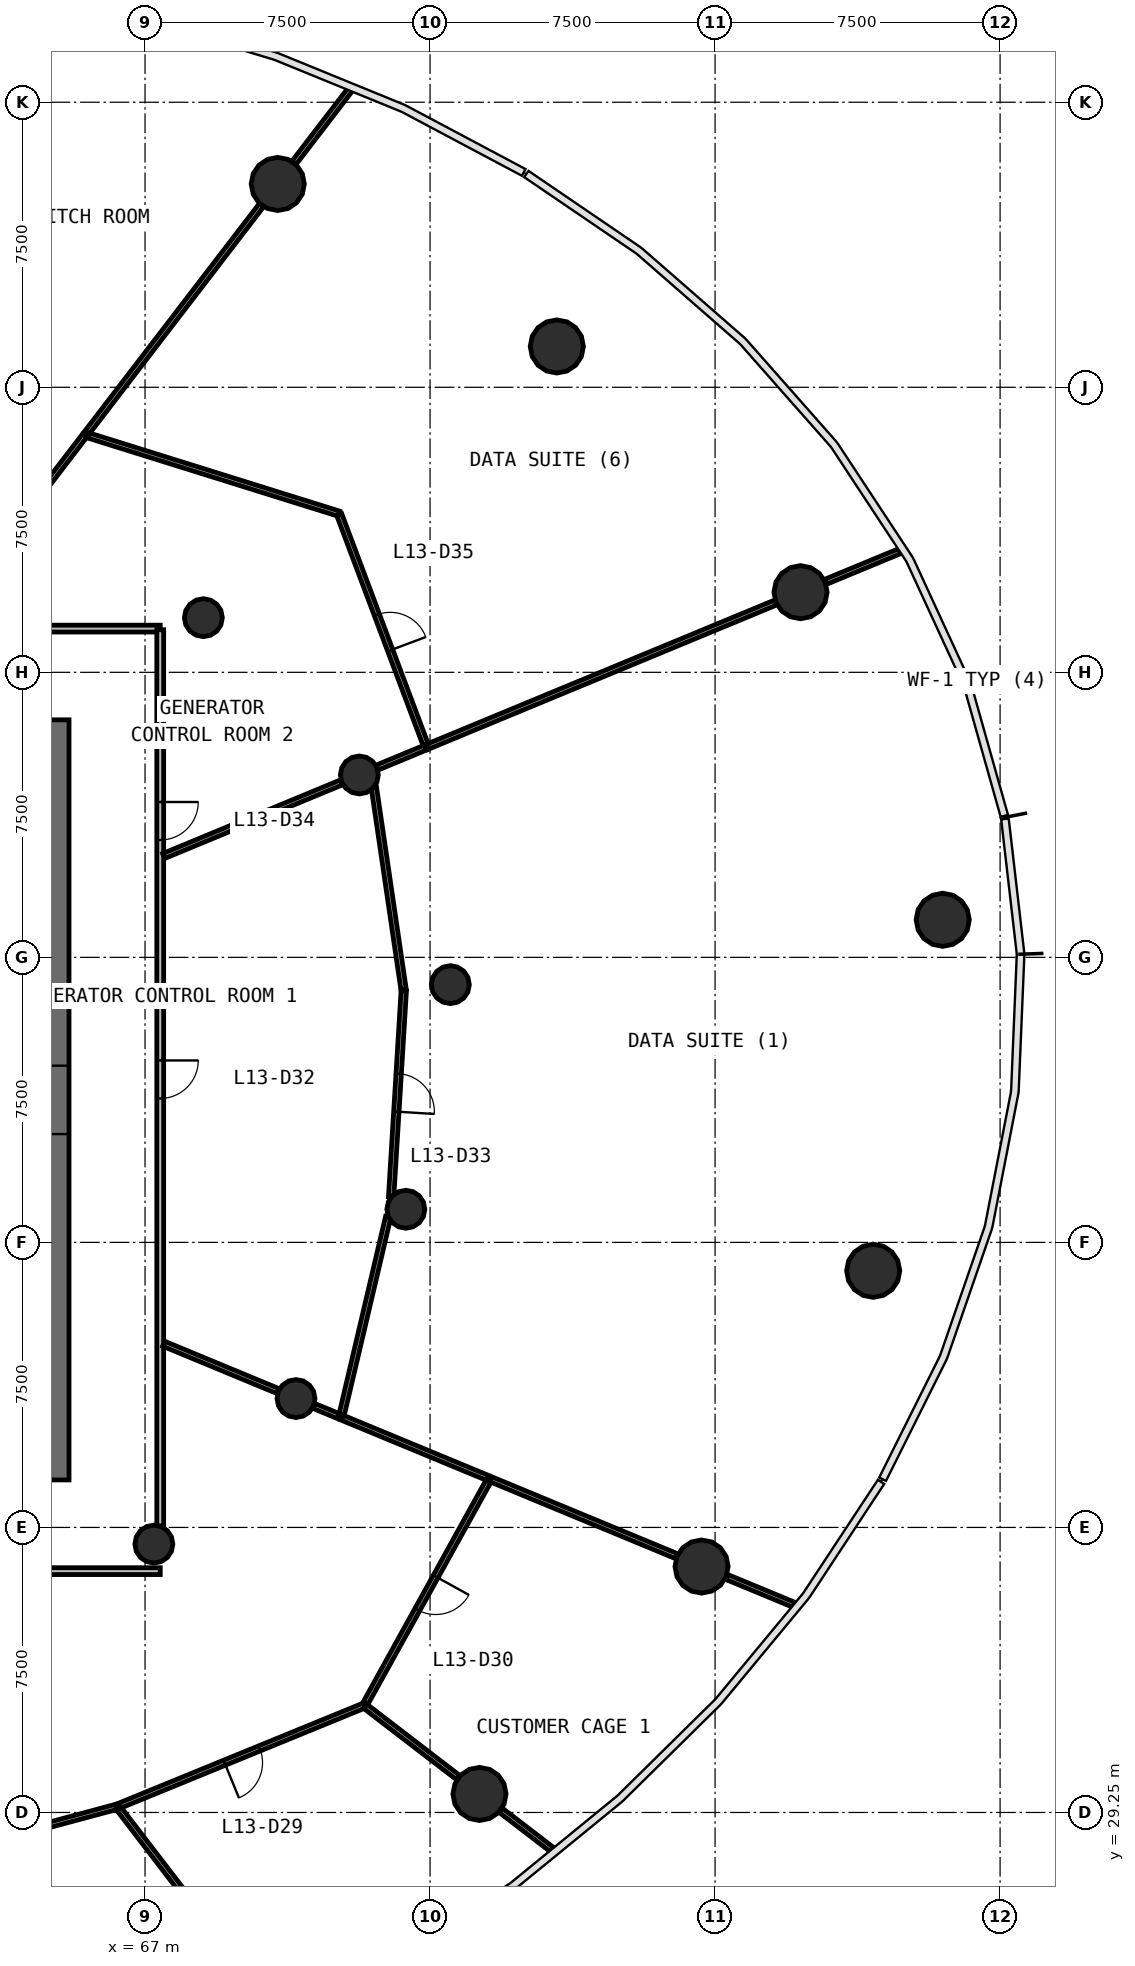
"""IFC4 building model, lengths in metres.
Left out: names, types, materials, properties, quantities, classifications, styles, units other than length and angle.
Written with IfcOpenShell. Run it as: python <this file> out.ifc"""

import sys

from ifc_helpers import new_model, si_unit, direction, frame, frame_2d, origin, origin_2d, place, context, subcontext, project, spatial, rectangle, circle, extrude, source, transform, mapped, element, fill, save


model = new_model("IFC4")
c1 = context("Model", 3, precision=1e-05, world=origin(), true_north=direction((0.0, 1.0)))
c2 = subcontext(c1, "Body", "Model", "MODEL_VIEW")
j1 = project(units=[si_unit("LENGTHUNIT", "METRE"), si_unit("PLANEANGLEUNIT", "RADIAN")], contexts=[c1])
p1 = place(None, origin())
s1 = spatial("IfcSite", under=j1, at=p1, CompositionType="ELEMENT")
p2 = place(p1, origin())
s2 = spatial("IfcBuilding", under=s1, at=p2, CompositionType="ELEMENT")
p3 = place(p2, frame((0.0, 0.0, 57.8)))
s3 = spatial("IfcBuildingStorey", under=s2, at=p3, CompositionType="ELEMENT", Elevation=57.8)
p4 = place(p3, frame((64.5, 38.0, 0.0), z_axis=(0.0, 0.0, 1.0), x_axis=(0.0, 1.0, 0.0)))
e1 = element("IfcWall", 1, at=p4, inside=s3, PredefinedType="SHEAR", context=c2, shape_type="SweptSolid", body=[
    extrude(rectangle(XDim=20.0, YDim=1.0, at=frame_2d((10.0, 0.0))), origin(), (0.0, 0.0, 1.0), 4.4),
])
p5 = place(p4, frame((9.1, 0.0, 0.0)))
e2 = element("IfcOpeningElement", 2, at=p5, cuts=e1, PredefinedType="OPENING", context=c2, shape_type="SweptSolid", body=[
    extrude(rectangle(XDim=1.8, YDim=2.1, at=frame_2d((0.9, 1.05))), frame((0.0, 0.51, 0.0), z_axis=(0.0, -1.0, 0.0), x_axis=(1.0, 0.0, 0.0)), (0.0, 0.0, 1.0), 1.02),
])
m1 = source(origin(), c2, "Body", "SweptSolid", [
    extrude(circle(Radius=0.7, at=origin_2d()), origin(), (0.0, 0.0, 1.0), 4.4),
])
for number, where, z_axis, x_axis in (
    (3, (87.99, 52.738, 0.0), (0.0, 0.0, 1.0), (1.0, 0.0, 0.0)),
    (4, (84.249, 61.358, 0.0), (0.0, 0.0, 1.0), (1.0, 0.0, 0.0)),
    (5, (77.836, 67.824, 0.0), (0.0, 0.0, 1.0), (1.0, 0.0, 0.0)),
    (6, (70.492, 72.1, 0.0), (0.0, 0.0, 1.0), (1.0, 0.0, 0.0)),
    (7, (75.801, 29.737, 0.0), (0.0, 0.0, 1.0), (1.0, 0.0, 0.0)),
    (8, (81.645, 35.721, 0.0), (0.0, 0.0, 1.0), (1.0, 0.0, 0.0)),
    (9, (86.161, 43.503, 0.0), (0.0, 0.0, 1.0), (1.0, 0.0, 0.0)),
):
    element("IfcColumn", number, at=place(p3, frame(where, z_axis=z_axis, x_axis=x_axis)), inside=s3, PredefinedType="COLUMN", context=c2, shape_type="MappedRepresentation", body=[
        mapped(m1, transform((0.0, 0.0, 0.0), scale=1.0)),
    ])
m2 = source(origin(), c2, "Body", "SweptSolid", [
    extrude(circle(Radius=0.5, at=origin_2d()), origin(), (0.0, 0.0, 1.0), 4.4),
])
for number, where, z_axis, x_axis in (
    (10, (75.034, 51.032, 0.0), (0.0, 0.0, 1.0), (1.0, 0.0, 0.0)),
    (11, (72.639, 56.549, 0.0), (0.0, 0.0, 1.0), (1.0, 0.0, 0.0)),
    (12, (68.535, 60.688, 0.0), (0.0, 0.0, 1.0), (1.0, 0.0, 0.0)),
    (13, (67.232, 36.312, 0.0), (0.0, 0.0, 1.0), (1.0, 0.0, 0.0)),
    (14, (70.972, 40.141, 0.0), (0.0, 0.0, 1.0), (1.0, 0.0, 0.0)),
    (15, (73.863, 45.122, 0.0), (0.0, 0.0, 1.0), (1.0, 0.0, 0.0)),
):
    element("IfcColumn", number, at=place(p3, frame(where, z_axis=z_axis, x_axis=x_axis)), inside=s3, PredefinedType="COLUMN", context=c2, shape_type="MappedRepresentation", body=[
        mapped(m2, transform((0.0, 0.0, 0.0), scale=1.0)),
    ])
p6 = place(p3, frame((67.4, 35.6, 0.0), z_axis=(0.0, 0.0, 1.0), x_axis=(-1.0, 0.0, 0.0)))
e16 = element("IfcWall", 16, at=p6, inside=s3, PredefinedType="PARTITIONING", context=c2, shape_type="SweptSolid", body=[
    extrude(rectangle(XDim=30.8, YDim=0.18, at=frame_2d((15.4, 0.0))), origin(), (0.0, 0.0, 1.0), 3.05),
])
p7 = place(p6, frame((17.25, 0.0, 0.0)))
e17 = element("IfcOpeningElement", 17, at=p7, cuts=e16, PredefinedType="OPENING", context=c2, shape_type="SweptSolid", body=[
    extrude(rectangle(XDim=0.9, YDim=2.1, at=frame_2d((0.45, 1.05))), frame((0.0, 0.1, 0.0), z_axis=(0.0, -1.0, 0.0), x_axis=(1.0, 0.0, 0.0)), (0.0, 0.0, 1.0), 0.2),
])
p8 = place(p6, frame((14.85, 0.0, 0.0)))
e18 = element("IfcOpeningElement", 18, at=p8, cuts=e16, PredefinedType="OPENING", context=c2, shape_type="SweptSolid", body=[
    extrude(rectangle(XDim=0.9, YDim=2.1, at=frame_2d((0.45, 1.05))), frame((0.0, 0.1, 0.0), z_axis=(0.0, -1.0, 0.0), x_axis=(1.0, 0.0, 0.0)), (0.0, 0.0, 1.0), 0.2),
])
p9 = place(p6, frame((12.55, 0.0, 0.0)))
e19 = element("IfcOpeningElement", 19, at=p9, cuts=e16, PredefinedType="OPENING", context=c2, shape_type="SweptSolid", body=[
    extrude(rectangle(XDim=1.0, YDim=2.1, at=frame_2d((0.5, 1.05))), frame((0.0, 0.1, 0.0), z_axis=(0.0, -1.0, 0.0), x_axis=(1.0, 0.0, 0.0)), (0.0, 0.0, 1.0), 0.2),
])
p10 = place(p6, frame((20.95, 0.0, 0.0)))
e20 = element("IfcOpeningElement", 20, at=p10, cuts=e16, PredefinedType="OPENING", context=c2, shape_type="SweptSolid", body=[
    extrude(rectangle(XDim=1.0, YDim=2.1, at=frame_2d((0.5, 1.05))), frame((0.0, 0.1, 0.0), z_axis=(0.0, -1.0, 0.0), x_axis=(1.0, 0.0, 0.0)), (0.0, 0.0, 1.0), 0.2),
])
p11 = place(p3, frame((36.6, 60.4, 0.0), z_axis=(0.0, 0.0, 1.0), x_axis=(1.0, 0.0, 0.0)))
e21 = element("IfcWall", 21, at=p11, inside=s3, PredefinedType="PARTITIONING", context=c2, shape_type="SweptSolid", body=[
    extrude(rectangle(XDim=30.8, YDim=0.18, at=frame_2d((15.4, 0.0))), origin(), (0.0, 0.0, 1.0), 3.05),
])
p12 = place(p11, frame((20.95, 0.0, 0.0)))
e22 = element("IfcOpeningElement", 22, at=p12, cuts=e21, PredefinedType="OPENING", context=c2, shape_type="SweptSolid", body=[
    extrude(rectangle(XDim=1.0, YDim=2.1, at=frame_2d((0.5, 1.05))), frame((0.0, 0.1, 0.0), z_axis=(0.0, -1.0, 0.0), x_axis=(1.0, 0.0, 0.0)), (0.0, 0.0, 1.0), 0.2),
])
p13 = place(p11, frame((14.95, 0.0, 0.0)))
e23 = element("IfcOpeningElement", 23, at=p13, cuts=e21, PredefinedType="OPENING", context=c2, shape_type="SweptSolid", body=[
    extrude(rectangle(XDim=1.0, YDim=2.1, at=frame_2d((0.5, 1.05))), frame((0.0, 0.1, 0.0), z_axis=(0.0, -1.0, 0.0), x_axis=(1.0, 0.0, 0.0)), (0.0, 0.0, 1.0), 0.2),
])
p14 = place(p11, frame((4.35, 0.0, 0.0)))
e24 = element("IfcOpeningElement", 24, at=p14, cuts=e21, PredefinedType="OPENING", context=c2, shape_type="SweptSolid", body=[
    extrude(rectangle(XDim=1.0, YDim=2.1, at=frame_2d((0.5, 1.05))), frame((0.0, 0.1, 0.0), z_axis=(0.0, -1.0, 0.0), x_axis=(1.0, 0.0, 0.0)), (0.0, 0.0, 1.0), 0.2),
])
p15 = place(p3, frame((67.4, 60.37, 0.0), z_axis=(0.0, 0.0, 1.0), x_axis=(0.0, -1.0, 0.0)))
e25 = element("IfcWall", 25, at=p15, inside=s3, PredefinedType="PARTITIONING", context=c2, shape_type="SweptSolid", body=[
    extrude(rectangle(XDim=23.583, YDim=0.18, at=frame_2d((11.791, 0.0))), origin(), (0.0, 0.0, 1.0), 3.05),
])
p16 = place(p15, frame((11.333, 0.0, 0.0)))
e26 = element("IfcOpeningElement", 26, at=p16, cuts=e25, PredefinedType="OPENING", context=c2, shape_type="SweptSolid", body=[
    extrude(rectangle(XDim=1.0, YDim=2.1, at=frame_2d((0.5, 1.05))), frame((0.0, 0.1, 0.0), z_axis=(0.0, -1.0, 0.0), x_axis=(1.0, 0.0, 0.0)), (0.0, 0.0, 1.0), 0.2),
])
p17 = place(p15, frame((4.532, 0.0, 0.0)))
e27 = element("IfcOpeningElement", 27, at=p17, cuts=e25, PredefinedType="OPENING", context=c2, shape_type="SweptSolid", body=[
    extrude(rectangle(XDim=1.0, YDim=2.1, at=frame_2d((0.5, 1.05))), frame((0.0, 0.1, 0.0), z_axis=(0.0, -1.0, 0.0), x_axis=(1.0, 0.0, 0.0)), (0.0, 0.0, 1.0), 0.2),
])
p18 = place(p3, frame((74.407, 57.281, 0.0), z_axis=(0.0, 0.0, 1.0), x_axis=(0.923881624853, 0.382678380966, 0.0)))
e28 = element("IfcWall", 28, at=p18, inside=s3, PredefinedType="PARTITIONING", context=c2, shape_type="SweptSolid", body=[
    extrude(rectangle(XDim=9.947, YDim=0.14, at=frame_2d((4.974, 0.0))), origin(), (0.0, 0.0, 1.0), 3.05),
])
p19 = place(p3, frame((65.433, 65.507, 0.0), z_axis=(0.0, 0.0, 1.0), x_axis=(0.608761001487, 0.79335366834, 0.0)))
e29 = element("IfcWall", 29, at=p19, inside=s3, PredefinedType="PARTITIONING", context=c2, shape_type="SweptSolid", body=[
    extrude(rectangle(XDim=7.606, YDim=0.14, at=frame_2d((3.803, 0.0))), origin(), (0.0, 0.0, 1.0), 3.05),
])
p20 = place(p3, frame((72.768, 32.064, 0.0), z_axis=(0.0, 0.0, 1.0), x_axis=(-0.925503200364, -0.378739786814, 0.0)))
e30 = element("IfcWall", 30, at=p20, inside=s3, PredefinedType="PARTITIONING", context=c2, shape_type="SweptSolid", body=[
    extrude(rectangle(XDim=7.022, YDim=0.14, at=frame_2d((3.511, 0.0))), origin(), (0.0, 0.0, 1.0), 3.05),
])
p21 = place(p20, frame((2.972, 0.0, 0.0)))
e31 = element("IfcOpeningElement", 31, at=p21, cuts=e30, PredefinedType="OPENING", context=c2, shape_type="SweptSolid", body=[
    extrude(rectangle(XDim=1.0, YDim=2.1, at=frame_2d((0.5, 1.05))), frame((0.0, 0.08, 0.0), z_axis=(0.0, -1.0, 0.0), x_axis=(1.0, 0.0, 0.0)), (0.0, 0.0, 1.0), 0.16),
])
p22 = place(p3, frame((72.101, 63.424, 0.0), z_axis=(0.0, 0.0, 1.0), x_axis=(-0.954540929829, 0.298079877351, 0.0)))
e32 = element("IfcWall", 32, at=p22, inside=s3, PredefinedType="PARTITIONING", context=c2, shape_type="SweptSolid", body=[
    extrude(rectangle(XDim=6.911, YDim=0.14, at=frame_2d((3.456, 0.0))), origin(), (0.0, 0.0, 1.0), 3.05),
])
p23 = place(p3, frame((76.071, 38.029, 0.0), z_axis=(0.0, 0.0, 1.0), x_axis=(-0.484378309165, -0.874858647788, 0.0)))
e33 = element("IfcWall", 33, at=p23, inside=s3, PredefinedType="PARTITIONING", context=c2, shape_type="SweptSolid", body=[
    extrude(rectangle(XDim=6.789, YDim=0.14, at=frame_2d((3.395, 0.0))), origin(), (0.0, 0.0, 1.0), 3.05),
])
p24 = place(p23, frame((2.939, 0.0, 0.0)))
e34 = element("IfcOpeningElement", 34, at=p24, cuts=e33, PredefinedType="OPENING", context=c2, shape_type="SweptSolid", body=[
    extrude(rectangle(XDim=1.0, YDim=2.1, at=frame_2d((0.5, 1.05))), frame((0.0, 0.08, 0.0), z_axis=(0.0, -1.0, 0.0), x_axis=(1.0, 0.0, 0.0)), (0.0, 0.0, 1.0), 0.16),
])
p25 = place(p3, frame((72.112, 63.396, 0.0), z_axis=(0.0, 0.0, 1.0), x_axis=(0.351475385959, -0.936197122974, 0.0)))
e35 = element("IfcWall", 35, at=p25, inside=s3, PredefinedType="PARTITIONING", context=c2, shape_type="SweptSolid", body=[
    extrude(rectangle(XDim=6.461, YDim=0.14, at=frame_2d((3.231, 0.0))), origin(), (0.0, 0.0, 1.0), 3.05),
])
p26 = place(p25, frame((2.811, 0.0, 0.0)))
e36 = element("IfcOpeningElement", 36, at=p26, cuts=e35, PredefinedType="OPENING", context=c2, shape_type="SweptSolid", body=[
    extrude(rectangle(XDim=1.0, YDim=2.1, at=frame_2d((0.5, 1.05))), frame((0.0, 0.08, 0.0), z_axis=(0.0, -1.0, 0.0), x_axis=(1.0, 0.0, 0.0)), (0.0, 0.0, 1.0), 0.16),
])
p27 = place(p3, frame((66.24, 29.396, 0.0), z_axis=(0.0, 0.0, 1.0), x_axis=(-0.965712487128, -0.259613929145, 0.0)))
e37 = element("IfcWall", 37, at=p27, inside=s3, PredefinedType="PARTITIONING", context=c2, shape_type="SweptSolid", body=[
    extrude(rectangle(XDim=6.088, YDim=0.14, at=frame_2d((3.044, 0.0))), origin(), (0.0, 0.0, 1.0), 3.05),
])
p28 = place(p27, frame((2.638, 0.0, 0.0)))
e38 = element("IfcOpeningElement", 38, at=p28, cuts=e37, PredefinedType="OPENING", context=c2, shape_type="SweptSolid", body=[
    extrude(rectangle(XDim=1.0, YDim=2.1, at=frame_2d((0.5, 1.05))), frame((0.0, 0.08, 0.0), z_axis=(0.0, -1.0, 0.0), x_axis=(1.0, 0.0, 0.0)), (0.0, 0.0, 1.0), 0.16),
])
p29 = place(p3, frame((73.808, 50.871, 0.0), z_axis=(0.0, 0.0, 1.0), x_axis=(-0.061254326826, -0.998122190639, 0.0)))
e39 = element("IfcWall", 39, at=p29, inside=s3, PredefinedType="PARTITIONING", context=c2, shape_type="SweptSolid", body=[
    extrude(rectangle(XDim=5.437, YDim=0.14, at=frame_2d((2.718, 0.0))), origin(), (0.0, 0.0, 1.0), 3.05),
])
p30 = place(p29, frame((2.186, 0.0, 0.0)))
e40 = element("IfcOpeningElement", 40, at=p30, cuts=e39, PredefinedType="OPENING", context=c2, shape_type="SweptSolid", body=[
    extrude(rectangle(XDim=1.0, YDim=2.1, at=frame_2d((0.5, 1.05))), frame((0.0, 0.08, 0.0), z_axis=(0.0, -1.0, 0.0), x_axis=(1.0, 0.0, 0.0)), (0.0, 0.0, 1.0), 0.16),
])
p31 = place(p3, frame((72.158, 39.65, 0.0), z_axis=(0.0, 0.0, 1.0), x_axis=(0.229149871326, 0.973391152863, 0.0)))
e41 = element("IfcWall", 41, at=p31, inside=s3, PredefinedType="PARTITIONING", context=c2, shape_type="SweptSolid", body=[
    extrude(rectangle(XDim=5.417, YDim=0.14, at=frame_2d((2.708, 0.0))), origin(), (0.0, 0.0, 1.0), 3.05),
])
p32 = place(p3, frame((73.804, 50.901, 0.0), z_axis=(0.0, 0.0, 1.0), x_axis=(-0.145444313647, 0.989366439509, 0.0)))
e42 = element("IfcWall", 42, at=p32, inside=s3, PredefinedType="PARTITIONING", context=c2, shape_type="SweptSolid", body=[
    extrude(rectangle(XDim=5.376, YDim=0.14, at=frame_2d((2.688, 0.0))), origin(), (0.0, 0.0, 1.0), 3.05),
])
p33 = place(p3, frame((76.099, 38.018, 0.0), z_axis=(0.0, 0.0, 1.0), x_axis=(0.923875284448, -0.382693687936, 0.0)))
e43 = element("IfcWall", 43, at=p33, inside=s3, PredefinedType="PARTITIONING", context=c2, shape_type="SweptSolid", body=[
    extrude(rectangle(XDim=5.298, YDim=0.14, at=frame_2d((2.649, 0.0))), origin(), (0.0, 0.0, 1.0), 3.05),
])
p34 = place(p3, frame((67.49, 54.416, 0.0), z_axis=(0.0, 0.0, 1.0), x_axis=(0.923890025086, 0.382658100067, 0.0)))
e44 = element("IfcWall", 44, at=p34, inside=s3, PredefinedType="PARTITIONING", context=c2, shape_type="SweptSolid", body=[
    extrude(rectangle(XDim=5.068, YDim=0.14, at=frame_2d((2.534, 0.0))), origin(), (0.0, 0.0, 1.0), 3.05),
])
p35 = place(p3, frame((66.313, 29.347, 0.0), z_axis=(0.0, 0.0, 1.0), x_axis=(0.608768802399, -0.793347682435, 0.0)))
e45 = element("IfcWall", 45, at=p35, inside=s3, PredefinedType="PARTITIONING", context=c2, shape_type="SweptSolid", body=[
    extrude(rectangle(XDim=4.361, YDim=0.14, at=frame_2d((2.18, 0.0))), origin(), (0.0, 0.0, 1.0), 3.05),
])
p36 = place(p3, frame((72.186, 39.639, 0.0), z_axis=(0.0, 0.0, 1.0), x_axis=(0.923883699466, -0.382673372291, 0.0)))
e46 = element("IfcWall", 46, at=p36, inside=s3, PredefinedType="PARTITIONING", context=c2, shape_type="SweptSolid", body=[
    extrude(rectangle(XDim=4.135, YDim=0.14, at=frame_2d((2.067, 0.0))), origin(), (0.0, 0.0, 1.0), 3.05),
])
p37 = place(p3, frame((67.49, 41.584, 0.0), z_axis=(0.0, 0.0, 1.0), x_axis=(0.923911109142, -0.382607190737, 0.0)))
e47 = element("IfcWall", 47, at=p37, inside=s3, PredefinedType="PARTITIONING", context=c2, shape_type="SweptSolid", body=[
    extrude(rectangle(XDim=3.264, YDim=0.14, at=frame_2d((1.632, 0.0))), origin(), (0.0, 0.0, 1.0), 3.05),
])
p38 = place(p3, frame((72.792, 32.046, 0.0), z_axis=(0.0, 0.0, 1.0), x_axis=(0.793358163661, -0.608755143019, 0.0)))
e48 = element("IfcWall", 48, at=p38, inside=s3, PredefinedType="PARTITIONING", context=c2, shape_type="SweptSolid", body=[
    extrude(rectangle(XDim=3.088, YDim=0.14, at=frame_2d((1.544, 0.0))), origin(), (0.0, 0.0, 1.0), 3.05),
])
p39 = place(p3, frame((70.921, 72.658, 0.0), z_axis=(0.0, 0.0, 1.0), x_axis=(0.608826142, 0.793303680073, 0.0)))
e49 = element("IfcWall", 49, at=p39, inside=s3, PredefinedType="PARTITIONING", context=c2, shape_type="SweptSolid", body=[
    extrude(rectangle(XDim=2.428, YDim=0.14, at=frame_2d((1.214, 0.0))), origin(), (0.0, 0.0, 1.0), 3.05),
])
p40 = place(p3, frame((84.9, 61.628, 0.0), z_axis=(0.0, 0.0, 1.0), x_axis=(0.923903507837, 0.382625545679, 0.0)))
e50 = element("IfcWall", 50, at=p40, inside=s3, PredefinedType="PARTITIONING", context=c2, shape_type="SweptSolid", body=[
    extrude(rectangle(XDim=2.127, YDim=0.14, at=frame_2d((1.063, 0.0))), origin(), (0.0, 0.0, 1.0), 3.05),
])
p41 = place(p3, frame((64.142, 63.824, 0.0), z_axis=(0.0, 0.0, 1.0), x_axis=(0.608762392913, 0.793352600661, 0.0)))
e51 = element("IfcWall", 51, at=p41, inside=s3, PredefinedType="PARTITIONING", context=c2, shape_type="SweptSolid", body=[
    extrude(rectangle(XDim=2.091, YDim=0.14, at=frame_2d((1.045, 0.0))), origin(), (0.0, 0.0, 1.0), 3.05),
])
p42 = place(p3, frame((82.296, 35.451, 0.0), z_axis=(0.0, 0.0, 1.0), x_axis=(0.923914867117, -0.382598115939, 0.0)))
e52 = element("IfcWall", 52, at=p42, inside=s3, PredefinedType="PARTITIONING", context=c2, shape_type="SweptSolid", body=[
    extrude(rectangle(XDim=1.926, YDim=0.14, at=frame_2d((0.963, 0.0))), origin(), (0.0, 0.0, 1.0), 3.05),
])
p43 = place(p3, frame((76.359, 29.309, 0.0), z_axis=(0.0, 0.0, 1.0), x_axis=(0.793288592826, -0.608845800258, 0.0)))
e53 = element("IfcWall", 53, at=p43, inside=s3, PredefinedType="PARTITIONING", context=c2, shape_type="SweptSolid", body=[
    extrude(rectangle(XDim=1.719, YDim=0.14, at=frame_2d((0.86, 0.0))), origin(), (0.0, 0.0, 1.0), 3.05),
])
p44 = place(p3, frame((73.106, 56.742, 0.0), z_axis=(0.0, 0.0, 1.0), x_axis=(0.923813917136, 0.382841803498, 0.0)))
e54 = element("IfcWall", 54, at=p44, inside=s3, PredefinedType="PARTITIONING", context=c2, shape_type="SweptSolid", body=[
    extrude(rectangle(XDim=1.379, YDim=0.14, at=frame_2d((0.689, 0.0))), origin(), (0.0, 0.0, 1.0), 3.05),
])
p45 = place(p3, frame((71.439, 39.948, 0.0), z_axis=(0.0, 0.0, 1.0), x_axis=(0.92386119338, -0.382727703944, 0.0)))
e55 = element("IfcWall", 55, at=p45, inside=s3, PredefinedType="PARTITIONING", context=c2, shape_type="SweptSolid", body=[
    extrude(rectangle(XDim=0.708, YDim=0.14, at=frame_2d((0.354, 0.0))), origin(), (0.0, 0.0, 1.0), 3.05),
])
m3 = source(origin(), c2, "Body", "SweptSolid", [
    extrude(rectangle(XDim=1.0, YDim=2.1, at=frame_2d((0.5, 1.05))), frame((0.0, 0.025, 0.0), z_axis=(0.0, -1.0, 0.0), x_axis=(1.0, 0.0, 0.0)), (0.0, 0.0, 1.0), 0.05),
])
p46 = place(p21, origin())
e56 = element("IfcDoor", 56, at=p46, inside=s3, OperationType="SINGLE_SWING_RIGHT", PredefinedType="DOOR", context=c2, shape_type="MappedRepresentation", body=[
    mapped(m3, transform((0.0, 0.0, 0.0), scale=1.0)),
])
fill(e31, e56)
p47 = place(p24, origin())
e57 = element("IfcDoor", 57, at=p47, inside=s3, OperationType="SINGLE_SWING_LEFT", PredefinedType="DOOR", context=c2, shape_type="MappedRepresentation", body=[
    mapped(m3, transform((0.0, 0.0, 0.0), scale=1.0)),
])
fill(e34, e57)
p48 = place(p16, origin())
e58 = element("IfcDoor", 58, at=p48, inside=s3, OperationType="SINGLE_SWING_LEFT", PredefinedType="DOOR", context=c2, shape_type="MappedRepresentation", body=[
    mapped(m3, transform((0.0, 0.0, 0.0), scale=1.0)),
])
fill(e26, e58)
p49 = place(p30, origin())
e59 = element("IfcDoor", 59, at=p49, inside=s3, OperationType="SINGLE_SWING_RIGHT", PredefinedType="DOOR", context=c2, shape_type="MappedRepresentation", body=[
    mapped(m3, transform((0.0, 0.0, 0.0), scale=1.0)),
])
fill(e40, e59)
p50 = place(p17, origin())
e60 = element("IfcDoor", 60, at=p50, inside=s3, OperationType="SINGLE_SWING_LEFT", PredefinedType="DOOR", context=c2, shape_type="MappedRepresentation", body=[
    mapped(m3, transform((0.0, 0.0, 0.0), scale=1.0)),
])
fill(e27, e60)
p51 = place(p26, origin())
e61 = element("IfcDoor", 61, at=p51, inside=s3, OperationType="SINGLE_SWING_RIGHT", PredefinedType="DOOR", context=c2, shape_type="MappedRepresentation", body=[
    mapped(m3, transform((0.0, 0.0, 0.0), scale=1.0)),
])
fill(e36, e61)
save(model, sys.argv[1])
